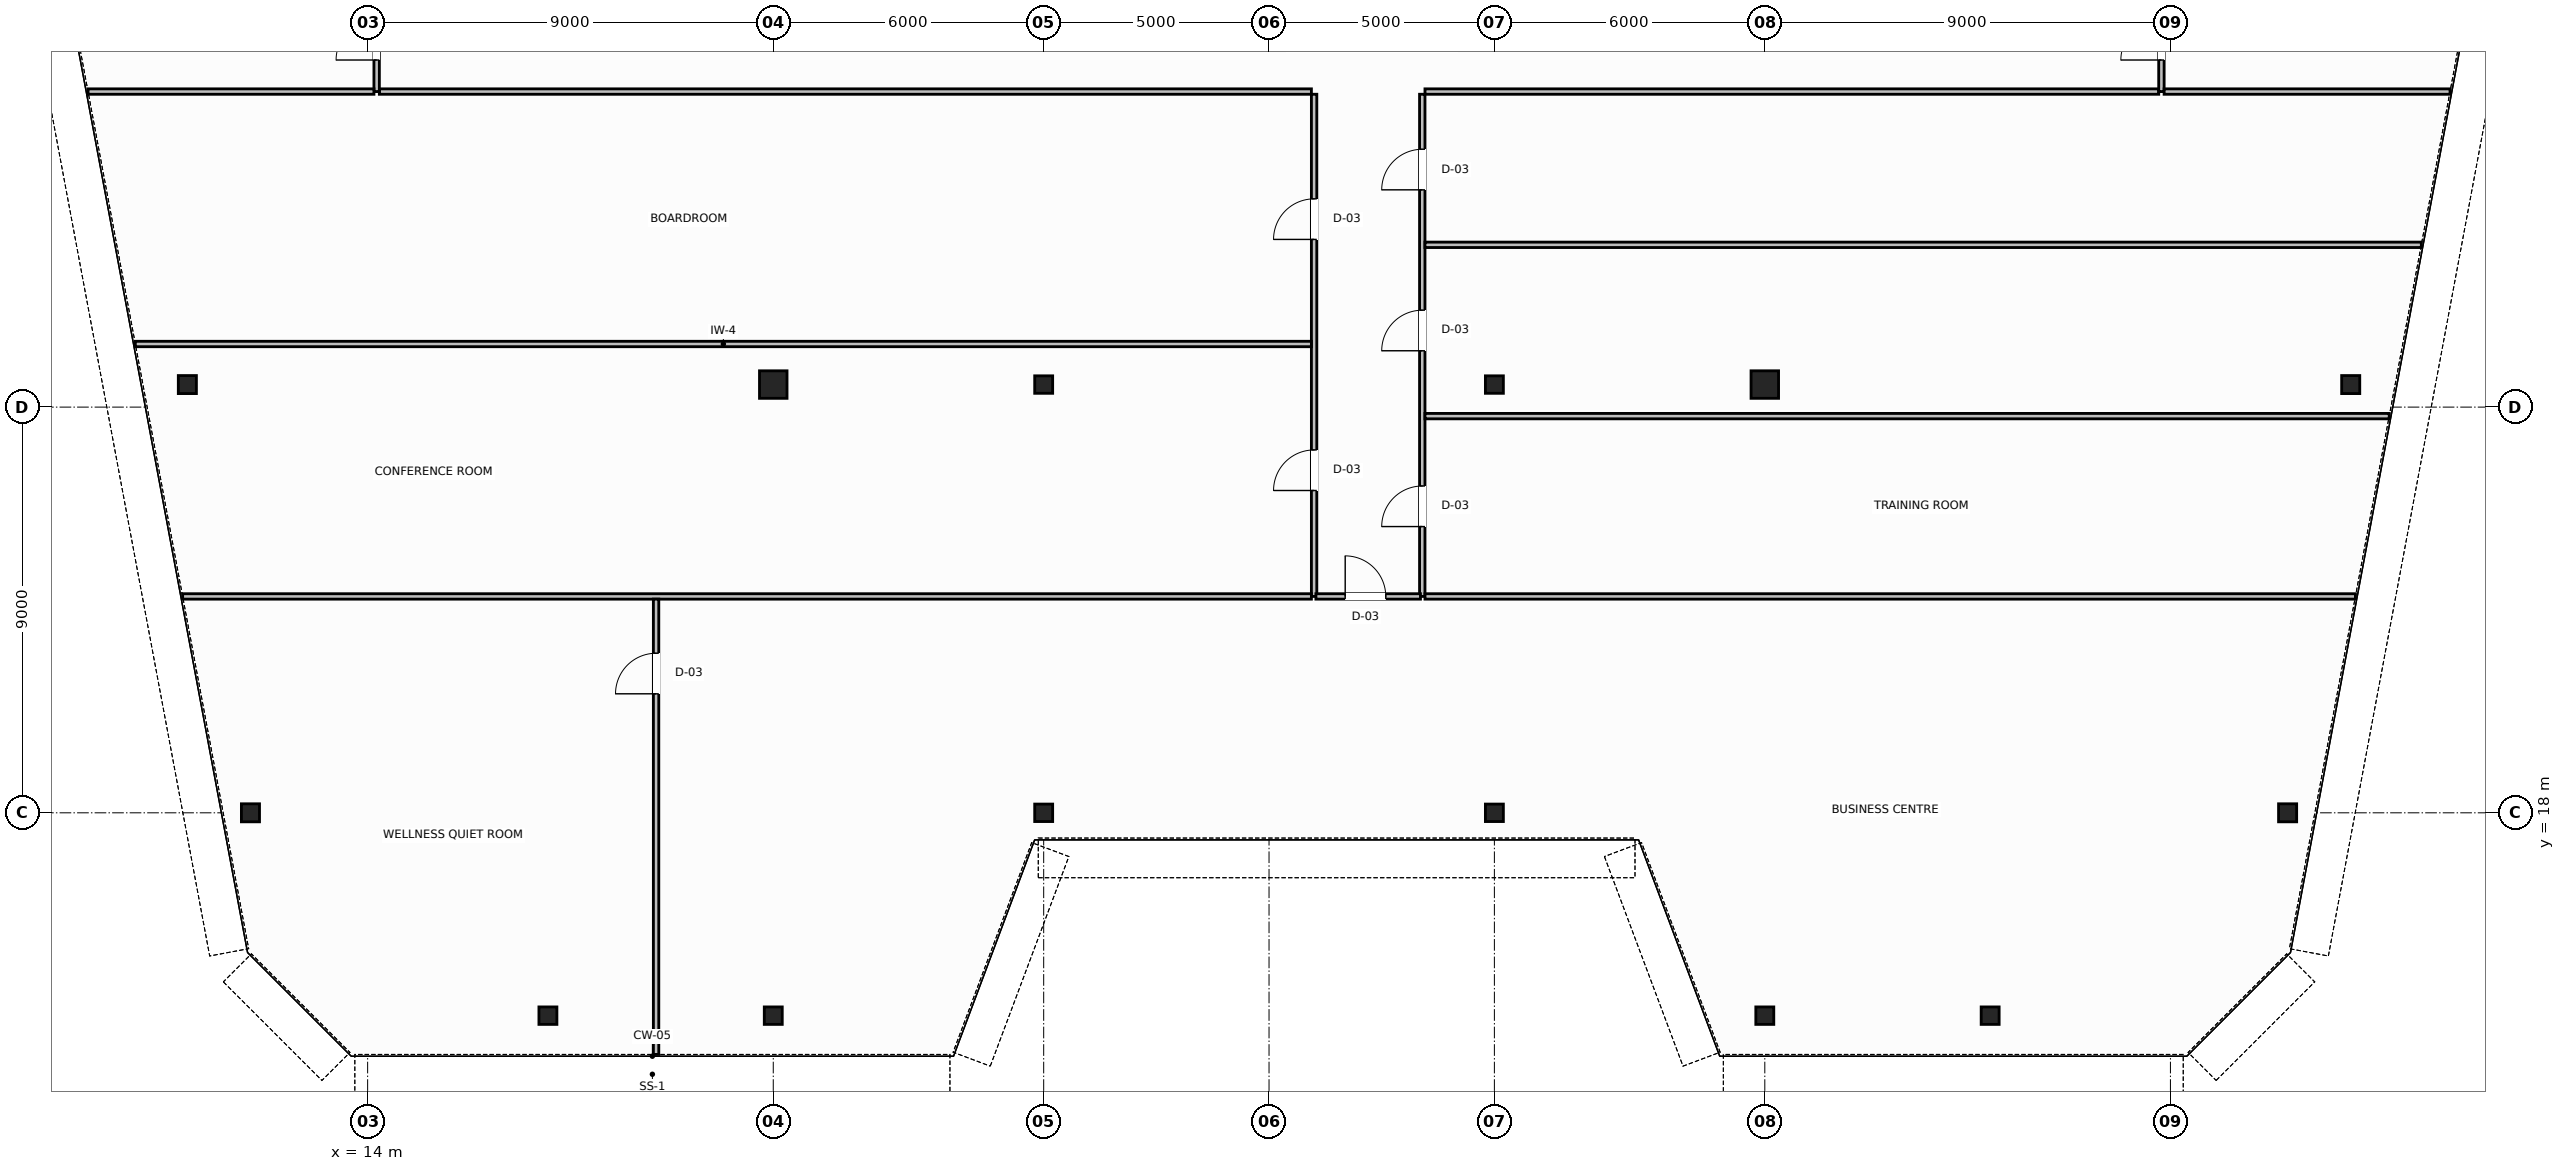
"""IFC4 building model, lengths in metres.
Left out: names, types, materials, properties, quantities, classifications, styles, units other than length and angle.
Written with IfcOpenShell. Run it as: python <this file> out.ifc"""

import sys

from ifc_helpers import new_model, si_unit, direction, frame, frame_2d, origin, origin_2d, place, context, subcontext, project, spatial, rectangle, hollow_circle, i_section, extrude, source, transform, mapped, element, fill, save


model = new_model("IFC4")
c1 = context("Model", 3, precision=1e-05, world=origin(), true_north=direction((0.0, 1.0)))
c2 = subcontext(c1, "Body", "Model", "MODEL_VIEW")
j1 = project(units=[si_unit("LENGTHUNIT", "METRE"), si_unit("PLANEANGLEUNIT", "RADIAN")], contexts=[c1])
p1 = place(None, origin())
s1 = spatial("IfcSite", under=j1, at=p1, CompositionType="ELEMENT")
p2 = place(p1, origin())
s2 = spatial("IfcBuilding", under=s1, at=p2, CompositionType="ELEMENT")
p3 = place(p2, frame((0.0, 0.0, 295.4)))
s3 = spatial("IfcBuildingStorey", under=s2, at=p3, CompositionType="ELEMENT", Elevation=295.4)
m1 = source(origin(), c2, "Body", "SweptSolid", [
    extrude(i_section(OverallWidth=0.401, OverallDepth=0.399, WebThickness=0.025, FlangeThickness=0.035, FilletRadius=0.015, at=origin_2d()), origin(), (0.0, 0.0, 1.0), 3.8),
])
for number, where, z_axis, x_axis in (
    (1, (10.0, 27.5, 0.0), (0.0, 0.0, 1.0), (1.0, 0.0, 0.0)),
    (2, (11.4, 18.0, 0.0), (0.0, 0.0, 1.0), (1.0, 0.0, 0.0)),
    (3, (58.0, 27.5, 0.0), (0.0, 0.0, 1.0), (1.0, 0.0, 0.0)),
    (4, (56.6, 18.0, 0.0), (0.0, 0.0, 1.0), (1.0, 0.0, 0.0)),
):
    element("IfcColumn", number, at=place(p3, frame(where, z_axis=z_axis, x_axis=x_axis)), inside=s3, PredefinedType="COLUMN", context=c2, shape_type="MappedRepresentation", body=[
        mapped(m1, transform((0.0, 0.0, 0.0), scale=1.0)),
    ])
m2 = source(origin(), c2, "Body", "SweptSolid", [
    extrude(hollow_circle(Radius=0.305, WallThickness=0.03, at=origin_2d()), origin(), (0.0, 0.0, 1.0), 3.8),
])
p4 = place(p3, frame((23.0, 27.5, 0.0), z_axis=(0.0, 0.0, 1.0), x_axis=(1.0, 0.0, 0.0)))
e5 = element("IfcColumn", 5, at=p4, inside=s3, PredefinedType="COLUMN", context=c2, shape_type="MappedRepresentation", body=[
    mapped(m2, transform((0.0, 0.0, 0.0), scale=1.0)),
])
m3 = source(origin(), c2, "Body", "SweptSolid", [
    extrude(i_section(OverallWidth=0.398, OverallDepth=0.387, WebThickness=0.021, FlangeThickness=0.029, FilletRadius=0.015, at=origin_2d()), origin(), (0.0, 0.0, 1.0), 3.8),
])
for number, where, z_axis, x_axis in (
    (6, (29.0, 27.5, 0.0), (0.0, 0.0, 1.0), (1.0, 0.0, 0.0)),
    (7, (39.0, 27.5, 0.0), (0.0, 0.0, 1.0), (1.0, 0.0, 0.0)),
):
    element("IfcColumn", number, at=place(p3, frame(where, z_axis=z_axis, x_axis=x_axis)), inside=s3, PredefinedType="COLUMN", context=c2, shape_type="MappedRepresentation", body=[
        mapped(m3, transform((0.0, 0.0, 0.0), scale=1.0)),
    ])
p5 = place(p3, frame((45.0, 27.5, 0.0), z_axis=(0.0, 0.0, 1.0), x_axis=(1.0, 0.0, 0.0)))
e8 = element("IfcColumn", 8, at=p5, inside=s3, PredefinedType="COLUMN", context=c2, shape_type="MappedRepresentation", body=[
    mapped(m2, transform((0.0, 0.0, 0.0), scale=1.0)),
])
for number, where, z_axis, x_axis in (
    (9, (18.0, 13.5, 0.0), (0.0, 0.0, 1.0), (1.0, 0.0, 0.0)),
    (10, (23.0, 13.5, 0.0), (0.0, 0.0, 1.0), (1.0, 0.0, 0.0)),
    (11, (29.0, 18.0, 0.0), (0.0, 0.0, 1.0), (1.0, 0.0, 0.0)),
    (12, (39.0, 18.0, 0.0), (0.0, 0.0, 1.0), (1.0, 0.0, 0.0)),
    (13, (45.0, 13.5, 0.0), (0.0, 0.0, 1.0), (1.0, 0.0, 0.0)),
    (14, (50.0, 13.5, 0.0), (0.0, 0.0, 1.0), (1.0, 0.0, 0.0)),
):
    element("IfcColumn", number, at=place(p3, frame(where, z_axis=z_axis, x_axis=x_axis)), inside=s3, PredefinedType="COLUMN", context=c2, shape_type="MappedRepresentation", body=[
        mapped(m3, transform((0.0, 0.0, 0.0), scale=1.0)),
    ])
p6 = place(p3, frame((14.26, 34.0, 0.0), z_axis=(0.0, 0.0, 1.0), x_axis=(1.0, 0.0, 0.0)))
e15 = element("IfcWall", 15, at=p6, inside=s3, PredefinedType="PARTITIONING", context=c2, shape_type="SweptSolid", body=[
    extrude(rectangle(XDim=20.68, YDim=0.12, at=frame_2d((10.34, 0.0))), origin(), (0.0, 0.0, 1.0), 3.21),
])
p7 = place(p3, frame((37.46, 34.0, 0.0), z_axis=(0.0, 0.0, 1.0), x_axis=(1.0, 0.0, 0.0)))
e16 = element("IfcWall", 16, at=p7, inside=s3, PredefinedType="PARTITIONING", context=c2, shape_type="SweptSolid", body=[
    extrude(rectangle(XDim=16.28, YDim=0.12, at=frame_2d((8.14, 0.0))), origin(), (0.0, 0.0, 1.0), 3.21),
])
p8 = place(p3, frame((14.2, 34.0, 0.0), z_axis=(0.0, 0.0, 1.0), x_axis=(0.0, 1.0, 0.0)))
e17 = element("IfcWall", 17, at=p8, inside=s3, PredefinedType="PARTITIONING", context=c2, shape_type="SweptSolid", body=[
    extrude(rectangle(XDim=2.44, YDim=0.12, at=frame_2d((1.22, 0.0))), origin(), (0.0, 0.0, 1.0), 3.58),
])
p9 = place(p8, frame((0.7, 0.0, 0.0)))
e18 = element("IfcOpeningElement", 18, at=p9, cuts=e17, PredefinedType="OPENING", context=c2, shape_type="SweptSolid", body=[
    extrude(rectangle(XDim=0.9, YDim=2.15, at=frame_2d((0.45, 1.075))), frame((0.0, 0.07, 0.0), z_axis=(0.0, -1.0, 0.0), x_axis=(1.0, 0.0, 0.0)), (0.0, 0.0, 1.0), 0.14),
])
p10 = place(p3, frame((53.8, 34.0, 0.0), z_axis=(0.0, 0.0, 1.0), x_axis=(0.0, 1.0, 0.0)))
e19 = element("IfcWall", 19, at=p10, inside=s3, PredefinedType="PARTITIONING", context=c2, shape_type="SweptSolid", body=[
    extrude(rectangle(XDim=2.44, YDim=0.12, at=frame_2d((1.22, 0.0))), origin(), (0.0, 0.0, 1.0), 3.58),
])
p11 = place(p10, frame((0.7, 0.0, 0.0)))
e20 = element("IfcOpeningElement", 20, at=p11, cuts=e19, PredefinedType="OPENING", context=c2, shape_type="SweptSolid", body=[
    extrude(rectangle(XDim=0.9, YDim=2.15, at=frame_2d((0.45, 1.075))), frame((0.0, 0.07, 0.0), z_axis=(0.0, -1.0, 0.0), x_axis=(1.0, 0.0, 0.0)), (0.0, 0.0, 1.0), 0.14),
])
p12 = place(p3, frame((35.0, 22.8, 0.0), z_axis=(0.0, 0.0, 1.0), x_axis=(0.0, 1.0, 0.0)))
e21 = element("IfcWall", 21, at=p12, inside=s3, PredefinedType="PARTITIONING", context=c2, shape_type="SweptSolid", body=[
    extrude(rectangle(XDim=11.14, YDim=0.12, at=frame_2d((5.57, 0.0))), origin(), (0.0, 0.0, 1.0), 3.58),
])
p13 = place(p12, frame((2.35, 0.0, 0.0)))
e22 = element("IfcOpeningElement", 22, at=p13, cuts=e21, PredefinedType="OPENING", context=c2, shape_type="SweptSolid", body=[
    extrude(rectangle(XDim=0.9, YDim=2.15, at=frame_2d((0.45, 1.075))), frame((0.0, 0.07, 0.0), z_axis=(0.0, -1.0, 0.0), x_axis=(1.0, 0.0, 0.0)), (0.0, 0.0, 1.0), 0.14),
])
p14 = place(p12, frame((7.92, 0.0, 0.0)))
e23 = element("IfcOpeningElement", 23, at=p14, cuts=e21, PredefinedType="OPENING", context=c2, shape_type="SweptSolid", body=[
    extrude(rectangle(XDim=0.9, YDim=2.15, at=frame_2d((0.45, 1.075))), frame((0.0, 0.07, 0.0), z_axis=(0.0, -1.0, 0.0), x_axis=(1.0, 0.0, 0.0)), (0.0, 0.0, 1.0), 0.14),
])
p15 = place(p3, frame((37.4, 22.8, 0.0), z_axis=(0.0, 0.0, 1.0), x_axis=(0.0, 1.0, 0.0)))
e24 = element("IfcWall", 24, at=p15, inside=s3, PredefinedType="PARTITIONING", context=c2, shape_type="SweptSolid", body=[
    extrude(rectangle(XDim=11.14, YDim=0.12, at=frame_2d((5.57, 0.0))), origin(), (0.0, 0.0, 1.0), 3.58),
])
p16 = place(p15, frame((1.55, 0.0, 0.0)))
e25 = element("IfcOpeningElement", 25, at=p16, cuts=e24, PredefinedType="OPENING", context=c2, shape_type="SweptSolid", body=[
    extrude(rectangle(XDim=0.9, YDim=2.15, at=frame_2d((0.45, 1.075))), frame((0.0, 0.07, 0.0), z_axis=(0.0, -1.0, 0.0), x_axis=(1.0, 0.0, 0.0)), (0.0, 0.0, 1.0), 0.14),
])
p17 = place(p15, frame((5.45, 0.0, 0.0)))
e26 = element("IfcOpeningElement", 26, at=p17, cuts=e24, PredefinedType="OPENING", context=c2, shape_type="SweptSolid", body=[
    extrude(rectangle(XDim=0.9, YDim=2.15, at=frame_2d((0.45, 1.075))), frame((0.0, 0.07, 0.0), z_axis=(0.0, -1.0, 0.0), x_axis=(1.0, 0.0, 0.0)), (0.0, 0.0, 1.0), 0.14),
])
p18 = place(p15, frame((9.02, 0.0, 0.0)))
e27 = element("IfcOpeningElement", 27, at=p18, cuts=e24, PredefinedType="OPENING", context=c2, shape_type="SweptSolid", body=[
    extrude(rectangle(XDim=0.9, YDim=2.15, at=frame_2d((0.45, 1.075))), frame((0.0, 0.07, 0.0), z_axis=(0.0, -1.0, 0.0), x_axis=(1.0, 0.0, 0.0)), (0.0, 0.0, 1.0), 0.14),
])
p19 = place(p3, frame((35.04, 22.8, 0.0), z_axis=(0.0, 0.0, 1.0), x_axis=(1.0, 0.0, 0.0)))
e28 = element("IfcWall", 28, at=p19, inside=s3, PredefinedType="PARTITIONING", context=c2, shape_type="SweptSolid", body=[
    extrude(rectangle(XDim=2.32, YDim=0.12, at=frame_2d((1.16, 0.0))), origin(), (0.0, 0.0, 1.0), 3.58),
])
p20 = place(p19, frame((0.65, 0.0, 0.0)))
e29 = element("IfcOpeningElement", 29, at=p20, cuts=e28, PredefinedType="OPENING", context=c2, shape_type="SweptSolid", body=[
    extrude(rectangle(XDim=0.9, YDim=2.15, at=frame_2d((0.45, 1.075))), frame((0.0, 0.07, 0.0), z_axis=(0.0, -1.0, 0.0), x_axis=(1.0, 0.0, 0.0)), (0.0, 0.0, 1.0), 0.14),
])
for number, where, z_axis, x_axis in (
    (30, (7.796, 34.0, 0.0), (0.0, 0.0, 1.0), (1.0, 0.0, 0.0)),
    (31, (53.86, 34.0, 0.0), (0.0, 0.0, 1.0), (1.0, 0.0, 0.0)),
):
    element("IfcWall", number, at=place(p3, frame(where, z_axis=z_axis, x_axis=x_axis)), inside=s3, PredefinedType="PARTITIONING", context=c2, shape_type="SweptSolid", body=[
        extrude(rectangle(XDim=6.344, YDim=0.12, at=frame_2d((3.172, 0.0))), origin(), (0.0, 0.0, 1.0), 3.21),
    ])
p21 = place(p3, frame((8.845, 28.4, 0.0), z_axis=(0.0, 0.0, 1.0), x_axis=(1.0, 0.0, 0.0)))
e32 = element("IfcWall", 32, at=p21, inside=s3, PredefinedType="PARTITIONING", context=c2, shape_type="SweptSolid", body=[
    extrude(rectangle(XDim=26.095, YDim=0.12, at=frame_2d((13.047, 0.0))), origin(), (0.0, 0.0, 1.0), 3.58),
])
p22 = place(p3, frame((37.46, 26.8, 0.0), z_axis=(0.0, 0.0, 1.0), x_axis=(1.0, 0.0, 0.0)))
e33 = element("IfcWall", 33, at=p22, inside=s3, PredefinedType="PARTITIONING", context=c2, shape_type="SweptSolid", body=[
    extrude(rectangle(XDim=21.395, YDim=0.12, at=frame_2d((10.697, 0.0))), origin(), (0.0, 0.0, 1.0), 3.58),
])
p23 = place(p3, frame((37.46, 30.6, 0.0), z_axis=(0.0, 0.0, 1.0), x_axis=(1.0, 0.0, 0.0)))
e34 = element("IfcWall", 34, at=p23, inside=s3, PredefinedType="PARTITIONING", context=c2, shape_type="SweptSolid", body=[
    extrude(rectangle(XDim=22.107, YDim=0.12, at=frame_2d((11.054, 0.0))), origin(), (0.0, 0.0, 1.0), 3.58),
])
p24 = place(p3, frame((9.895, 22.8, 0.0), z_axis=(0.0, 0.0, 1.0), x_axis=(1.0, 0.0, 0.0)))
e35 = element("IfcWall", 35, at=p24, inside=s3, PredefinedType="PARTITIONING", context=c2, shape_type="SweptSolid", body=[
    extrude(rectangle(XDim=25.045, YDim=0.12, at=frame_2d((12.522, 0.0))), origin(), (0.0, 0.0, 1.0), 3.58),
])
p25 = place(p3, frame((37.46, 22.8, 0.0), z_axis=(0.0, 0.0, 1.0), x_axis=(1.0, 0.0, 0.0)))
e36 = element("IfcWall", 36, at=p25, inside=s3, PredefinedType="PARTITIONING", context=c2, shape_type="SweptSolid", body=[
    extrude(rectangle(XDim=20.645, YDim=0.12, at=frame_2d((10.323, 0.0))), origin(), (0.0, 0.0, 1.0), 3.58),
])
p26 = place(p3, frame((20.4, 12.64, 0.0), z_axis=(0.0, 0.0, 1.0), x_axis=(0.0, 1.0, 0.0)))
e37 = element("IfcWall", 37, at=p26, inside=s3, PredefinedType="PARTITIONING", context=c2, shape_type="SweptSolid", body=[
    extrude(rectangle(XDim=10.1, YDim=0.12, at=frame_2d((5.05, 0.0))), origin(), (0.0, 0.0, 1.0), 3.58),
])
p27 = place(p26, frame((8.0, 0.0, 0.0)))
e38 = element("IfcOpeningElement", 38, at=p27, cuts=e37, PredefinedType="OPENING", context=c2, shape_type="SweptSolid", body=[
    extrude(rectangle(XDim=0.9, YDim=2.15, at=frame_2d((0.45, 1.075))), frame((0.0, 0.07, 0.0), z_axis=(0.0, -1.0, 0.0), x_axis=(1.0, 0.0, 0.0)), (0.0, 0.0, 1.0), 0.14),
])
m4 = source(origin(), c2, "Body", "SweptSolid", [
    extrude(rectangle(XDim=0.9, YDim=2.15, at=frame_2d((0.45, 1.075))), frame((0.0, 0.025, 0.0), z_axis=(0.0, -1.0, 0.0), x_axis=(1.0, 0.0, 0.0)), (0.0, 0.0, 1.0), 0.05),
])
p28 = place(p9, origin())
e39 = element("IfcDoor", 39, at=p28, inside=s3, OperationType="SINGLE_SWING_LEFT", PredefinedType="DOOR", context=c2, shape_type="MappedRepresentation", body=[
    mapped(m4, transform((0.0, 0.0, 0.0), scale=1.0)),
])
fill(e18, e39)
p29 = place(p11, origin())
e40 = element("IfcDoor", 40, at=p29, inside=s3, OperationType="SINGLE_SWING_RIGHT", PredefinedType="DOOR", context=c2, shape_type="MappedRepresentation", body=[
    mapped(m4, transform((0.0, 0.0, 0.0), scale=1.0)),
])
fill(e20, e40)
p30 = place(p13, origin())
e41 = element("IfcDoor", 41, at=p30, inside=s3, OperationType="SINGLE_SWING_LEFT", PredefinedType="DOOR", context=c2, shape_type="MappedRepresentation", body=[
    mapped(m4, transform((0.0, 0.0, 0.0), scale=1.0)),
])
fill(e22, e41)
p31 = place(p14, origin())
e42 = element("IfcDoor", 42, at=p31, inside=s3, OperationType="SINGLE_SWING_RIGHT", PredefinedType="DOOR", context=c2, shape_type="MappedRepresentation", body=[
    mapped(m4, transform((0.0, 0.0, 0.0), scale=1.0)),
])
fill(e23, e42)
p32 = place(p16, origin())
e43 = element("IfcDoor", 43, at=p32, inside=s3, OperationType="SINGLE_SWING_RIGHT", PredefinedType="DOOR", context=c2, shape_type="MappedRepresentation", body=[
    mapped(m4, transform((0.0, 0.0, 0.0), scale=1.0)),
])
fill(e25, e43)
p33 = place(p17, origin())
e44 = element("IfcDoor", 44, at=p33, inside=s3, OperationType="SINGLE_SWING_LEFT", PredefinedType="DOOR", context=c2, shape_type="MappedRepresentation", body=[
    mapped(m4, transform((0.0, 0.0, 0.0), scale=1.0)),
])
fill(e26, e44)
p34 = place(p18, origin())
e45 = element("IfcDoor", 45, at=p34, inside=s3, OperationType="SINGLE_SWING_RIGHT", PredefinedType="DOOR", context=c2, shape_type="MappedRepresentation", body=[
    mapped(m4, transform((0.0, 0.0, 0.0), scale=1.0)),
])
fill(e27, e45)
p35 = place(p27, origin())
e46 = element("IfcDoor", 46, at=p35, inside=s3, OperationType="SINGLE_SWING_RIGHT", PredefinedType="DOOR", context=c2, shape_type="MappedRepresentation", body=[
    mapped(m4, transform((0.0, 0.0, 0.0), scale=1.0)),
])
fill(e38, e46)
p36 = place(p20, origin())
e47 = element("IfcDoor", 47, at=p36, inside=s3, OperationType="SINGLE_SWING_LEFT", PredefinedType="DOOR", context=c2, shape_type="MappedRepresentation", body=[
    mapped(m4, transform((0.0, 0.0, 0.0), scale=1.0)),
])
fill(e29, e47)
save(model, sys.argv[1])
